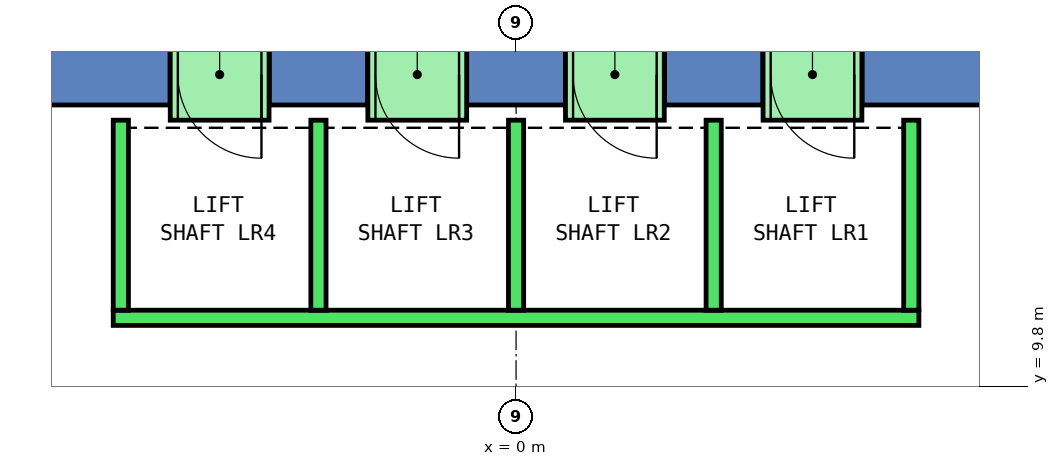
"""IFC4 building model, lengths in metres.
Left out: names, types, materials, properties, quantities, classifications, styles, units other than length and angle.
Written with IfcOpenShell. Run it as: python <this file> out.ifc"""

import sys

from ifc_helpers import new_model, si_unit, direction, frame, frame_2d, origin, place, context, subcontext, project, spatial, polyline, rectangle, outline, extrude, element, fill, save


model = new_model("IFC4")
c1 = context("Model", 3, precision=1e-05, world=origin(), true_north=direction((0.0, 1.0)))
c2 = subcontext(c1, "Body", "Model", "MODEL_VIEW")
j1 = project(units=[si_unit("LENGTHUNIT", "METRE"), si_unit("PLANEANGLEUNIT", "RADIAN")], contexts=[c1])
p1 = place(None, origin())
s1 = spatial("IfcSite", under=j1, at=p1, CompositionType="ELEMENT")
p2 = place(p1, origin())
s2 = spatial("IfcBuilding", under=s1, at=p2, CompositionType="ELEMENT")
p3 = place(p2, frame((0.0, 0.0, 39.2)))
s3 = spatial("IfcBuildingStorey", under=s2, at=p3, CompositionType="ELEMENT", Elevation=39.2)
p4 = place(p3, frame((0.0, 0.0, -0.4)))
e1 = element("IfcWall", 1, at=p4, inside=s3, PredefinedType="SHEAR", context=c2, shape_type="SweptSolid", body=[
    extrude(outline(polyline([(4.55, 14.5), (4.55, 13.5), (6.351, 13.5), (6.928, 14.5), (4.55, 14.5)])), origin(), (0.0, 0.0, 1.0), 4.2),
])
p5 = place(p3, frame((0.0, 0.0, -0.4)))
e2 = element("IfcWall", 2, at=p5, inside=s3, PredefinedType="SHEAR", context=c2, shape_type="SweptSolid", body=[
    extrude(outline(polyline([(1.95, 14.5), (1.95, 13.5), (3.25, 13.5), (3.25, 14.5), (1.95, 14.5)])), origin(), (0.0, 0.0, 1.0), 4.2),
])
p6 = place(p3, frame((0.0, 0.0, -0.4)))
e3 = element("IfcWall", 3, at=p6, inside=s3, PredefinedType="SHEAR", context=c2, shape_type="SweptSolid", body=[
    extrude(outline(polyline([(-0.65, 14.5), (-0.65, 13.5), (0.65, 13.5), (0.65, 14.5), (-0.65, 14.5)])), origin(), (0.0, 0.0, 1.0), 4.2),
])
p7 = place(p3, frame((0.0, 0.0, -0.4)))
e4 = element("IfcWall", 4, at=p7, inside=s3, PredefinedType="SHEAR", context=c2, shape_type="SweptSolid", body=[
    extrude(outline(polyline([(-3.25, 14.5), (-3.25, 13.5), (-1.95, 13.5), (-1.95, 14.5), (-3.25, 14.5)])), origin(), (0.0, 0.0, 1.0), 4.2),
])
p8 = place(p3, frame((0.0, 0.0, -0.4)))
e5 = element("IfcWall", 5, at=p8, inside=s3, PredefinedType="SHEAR", context=c2, shape_type="SweptSolid", body=[
    extrude(outline(polyline([(-4.55, 13.5), (-4.55, 14.5), (-6.928, 14.5), (-6.351, 13.5), (-4.55, 13.5)])), origin(), (0.0, 0.0, 1.0), 4.2),
])
p9 = place(p3, frame((0.0, 0.0, 3.6)))
e6 = element("IfcWall", 6, at=p9, inside=s3, PredefinedType="SHEAR", context=c2, shape_type="SweptSolid", body=[
    extrude(outline(polyline([(3.25, 14.5), (3.25, 13.5), (4.55, 13.5), (4.55, 14.5), (3.25, 14.5)])), origin(), (0.0, 0.0, 1.0), 0.2),
])
p10 = place(p3, frame((0.0, 0.0, 3.6)))
e7 = element("IfcWall", 7, at=p10, inside=s3, PredefinedType="SHEAR", context=c2, shape_type="SweptSolid", body=[
    extrude(outline(polyline([(0.65, 14.5), (0.65, 13.5), (1.95, 13.5), (1.95, 14.5), (0.65, 14.5)])), origin(), (0.0, 0.0, 1.0), 0.2),
])
p11 = place(p3, frame((0.0, 0.0, 3.6)))
e8 = element("IfcWall", 8, at=p11, inside=s3, PredefinedType="SHEAR", context=c2, shape_type="SweptSolid", body=[
    extrude(outline(polyline([(-1.95, 14.5), (-1.95, 13.5), (-0.65, 13.5), (-0.65, 14.5), (-1.95, 14.5)])), origin(), (0.0, 0.0, 1.0), 0.2),
])
p12 = place(p3, frame((0.0, 0.0, 3.6)))
e9 = element("IfcWall", 9, at=p12, inside=s3, PredefinedType="SHEAR", context=c2, shape_type="SweptSolid", body=[
    extrude(outline(polyline([(-4.55, 14.5), (-4.55, 13.5), (-3.25, 13.5), (-3.25, 14.5), (-4.55, 14.5)])), origin(), (0.0, 0.0, 1.0), 0.2),
])
p13 = place(p3, frame((5.3, 10.7, 0.0), z_axis=(0.0, 0.0, 1.0), x_axis=(-1.0, 0.0, 0.0)))
e10 = element("IfcWall", 10, at=p13, inside=s3, PredefinedType="STANDARD", context=c2, shape_type="SweptSolid", body=[
    extrude(rectangle(XDim=10.6, YDim=0.2, at=frame_2d((5.3, 0.0))), origin(), (0.0, 0.0, 1.0), 3.8),
])
for number, where, z_axis, x_axis in (
    (11, (5.2, 10.8, 0.0), (0.0, 0.0, 1.0), (0.0, 1.0, 0.0)),
    (12, (2.6, 10.8, 0.0), (0.0, 0.0, 1.0), (0.0, 1.0, 0.0)),
    (13, (0.0, 10.8, 0.0), (0.0, 0.0, 1.0), (0.0, 1.0, 0.0)),
    (14, (-2.6, 10.8, 0.0), (0.0, 0.0, 1.0), (0.0, 1.0, 0.0)),
    (15, (-5.2, 10.8, 0.0), (0.0, 0.0, 1.0), (0.0, 1.0, 0.0)),
):
    element("IfcWall", number, at=place(p3, frame(where, z_axis=z_axis, x_axis=x_axis)), inside=s3, PredefinedType="STANDARD", context=c2, shape_type="SweptSolid", body=[
        extrude(rectangle(XDim=2.5, YDim=0.2, at=frame_2d((1.25, 0.0))), origin(), (0.0, 0.0, 1.0), 3.8),
    ])
p14 = place(p3, frame((4.55, 13.9, 0.0), z_axis=(0.0, 0.0, 1.0), x_axis=(-1.0, 0.0, 0.0)))
e16 = element("IfcWall", 16, at=p14, inside=s3, PredefinedType="STANDARD", context=c2, shape_type="SweptSolid", body=[
    extrude(rectangle(XDim=1.3, YDim=1.2, at=frame_2d((0.65, 0.0))), origin(), (0.0, 0.0, 1.0), 2.4),
])
p15 = place(p14, frame((0.1, 0.0, 0.0)))
e17 = element("IfcOpeningElement", 17, at=p15, cuts=e16, PredefinedType="OPENING", context=c2, shape_type="SweptSolid", body=[
    extrude(rectangle(XDim=1.1, YDim=2.3, at=frame_2d((0.55, 1.15))), frame((0.0, 0.61, 0.0), z_axis=(0.0, -1.0, 0.0), x_axis=(1.0, 0.0, 0.0)), (0.0, 0.0, 1.0), 1.22),
])
p16 = place(p3, frame((1.95, 13.9, 0.0), z_axis=(0.0, 0.0, 1.0), x_axis=(-1.0, 0.0, 0.0)))
e18 = element("IfcWall", 18, at=p16, inside=s3, PredefinedType="STANDARD", context=c2, shape_type="SweptSolid", body=[
    extrude(rectangle(XDim=1.3, YDim=1.2, at=frame_2d((0.65, 0.0))), origin(), (0.0, 0.0, 1.0), 2.4),
])
p17 = place(p16, frame((0.1, 0.0, 0.0)))
e19 = element("IfcOpeningElement", 19, at=p17, cuts=e18, PredefinedType="OPENING", context=c2, shape_type="SweptSolid", body=[
    extrude(rectangle(XDim=1.1, YDim=2.3, at=frame_2d((0.55, 1.15))), frame((0.0, 0.61, 0.0), z_axis=(0.0, -1.0, 0.0), x_axis=(1.0, 0.0, 0.0)), (0.0, 0.0, 1.0), 1.22),
])
p18 = place(p3, frame((-0.65, 13.9, 0.0), z_axis=(0.0, 0.0, 1.0), x_axis=(-1.0, 0.0, 0.0)))
e20 = element("IfcWall", 20, at=p18, inside=s3, PredefinedType="STANDARD", context=c2, shape_type="SweptSolid", body=[
    extrude(rectangle(XDim=1.3, YDim=1.2, at=frame_2d((0.65, 0.0))), origin(), (0.0, 0.0, 1.0), 2.4),
])
p19 = place(p18, frame((0.1, 0.0, 0.0)))
e21 = element("IfcOpeningElement", 21, at=p19, cuts=e20, PredefinedType="OPENING", context=c2, shape_type="SweptSolid", body=[
    extrude(rectangle(XDim=1.1, YDim=2.3, at=frame_2d((0.55, 1.15))), frame((0.0, 0.61, 0.0), z_axis=(0.0, -1.0, 0.0), x_axis=(1.0, 0.0, 0.0)), (0.0, 0.0, 1.0), 1.22),
])
p20 = place(p3, frame((-3.25, 13.9, 0.0), z_axis=(0.0, 0.0, 1.0), x_axis=(-1.0, 0.0, 0.0)))
e22 = element("IfcWall", 22, at=p20, inside=s3, PredefinedType="STANDARD", context=c2, shape_type="SweptSolid", body=[
    extrude(rectangle(XDim=1.3, YDim=1.2, at=frame_2d((0.65, 0.0))), origin(), (0.0, 0.0, 1.0), 2.4),
])
p21 = place(p20, frame((0.1, 0.0, 0.0)))
e23 = element("IfcOpeningElement", 23, at=p21, cuts=e22, PredefinedType="OPENING", context=c2, shape_type="SweptSolid", body=[
    extrude(rectangle(XDim=1.1, YDim=2.3, at=frame_2d((0.55, 1.15))), frame((0.0, 0.61, 0.0), z_axis=(0.0, -1.0, 0.0), x_axis=(1.0, 0.0, 0.0)), (0.0, 0.0, 1.0), 1.22),
])
p22 = place(p15, origin())
e24 = element("IfcDoor", 24, at=p22, inside=s3, OperationType="SLIDING_TO_LEFT", PredefinedType="DOOR", context=c2, shape_type="SweptSolid", body=[
    extrude(rectangle(XDim=1.1, YDim=2.3, at=frame_2d((0.55, 1.15))), frame((0.0, 0.025, 0.0), z_axis=(0.0, -1.0, 0.0), x_axis=(1.0, 0.0, 0.0)), (0.0, 0.0, 1.0), 0.05),
])
fill(e17, e24)
p23 = place(p17, origin())
e25 = element("IfcDoor", 25, at=p23, inside=s3, OperationType="SLIDING_TO_LEFT", PredefinedType="DOOR", context=c2, shape_type="SweptSolid", body=[
    extrude(rectangle(XDim=1.1, YDim=2.3, at=frame_2d((0.55, 1.15))), frame((0.0, 0.025, 0.0), z_axis=(0.0, -1.0, 0.0), x_axis=(1.0, 0.0, 0.0)), (0.0, 0.0, 1.0), 0.05),
])
fill(e19, e25)
p24 = place(p19, origin())
e26 = element("IfcDoor", 26, at=p24, inside=s3, OperationType="SLIDING_TO_LEFT", PredefinedType="DOOR", context=c2, shape_type="SweptSolid", body=[
    extrude(rectangle(XDim=1.1, YDim=2.3, at=frame_2d((0.55, 1.15))), frame((0.0, 0.025, 0.0), z_axis=(0.0, -1.0, 0.0), x_axis=(1.0, 0.0, 0.0)), (0.0, 0.0, 1.0), 0.05),
])
fill(e21, e26)
p25 = place(p21, origin())
e27 = element("IfcDoor", 27, at=p25, inside=s3, OperationType="SLIDING_TO_LEFT", PredefinedType="DOOR", context=c2, shape_type="SweptSolid", body=[
    extrude(rectangle(XDim=1.1, YDim=2.3, at=frame_2d((0.55, 1.15))), frame((0.0, 0.025, 0.0), z_axis=(0.0, -1.0, 0.0), x_axis=(1.0, 0.0, 0.0)), (0.0, 0.0, 1.0), 0.05),
])
fill(e23, e27)
save(model, sys.argv[1])
